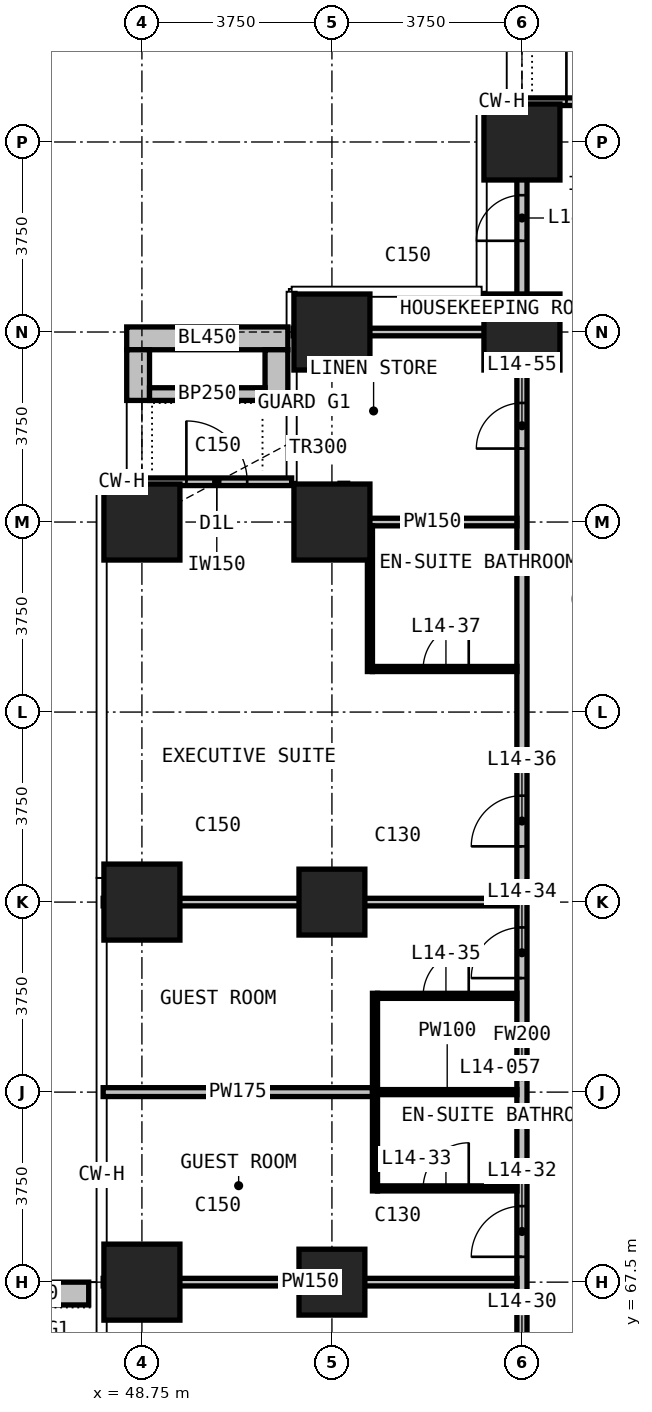
"""IFC4 building model, lengths in metres.
Left out: names, types, materials, properties, quantities, classifications, styles, units other than length and angle.
Written with IfcOpenShell. Run it as: python <this file> out.ifc"""

import sys

from ifc_helpers import new_model, si_unit, direction, frame, frame_2d, origin, origin_2d, place, context, subcontext, project, spatial, rectangle, extrude, element, fill, save


model = new_model("IFC4")
c1 = context("Model", 3, precision=1e-05, world=origin(), true_north=direction((0.0, 1.0)))
c2 = subcontext(c1, "Body", "Model", "MODEL_VIEW")
j1 = project(units=[si_unit("LENGTHUNIT", "METRE"), si_unit("PLANEANGLEUNIT", "RADIAN")], contexts=[c1])
p1 = place(None, origin())
s1 = spatial("IfcSite", under=j1, at=p1, CompositionType="ELEMENT")
p2 = place(p1, origin())
s2 = spatial("IfcBuilding", under=s1, at=p2, CompositionType="ELEMENT")
p3 = place(p2, frame((0.0, 0.0, 65.9)))
s3 = spatial("IfcBuildingStorey", under=s2, at=p3, CompositionType="ELEMENT", Elevation=65.9)
for number, where, z_axis, x_axis in (
    (1, (48.75, 67.5, 0.0), (0.0, 0.0, 1.0), (1.0, 0.0, 0.0)),
    (2, (48.75, 75.0, 0.0), (0.0, 0.0, 1.0), (1.0, 0.0, 0.0)),
    (3, (48.75, 82.5, 0.0), (0.0, 0.0, 1.0), (1.0, 0.0, 0.0)),
):
    element("IfcColumn", number, at=place(p3, frame(where, z_axis=z_axis, x_axis=x_axis)), inside=s3, PredefinedType="COLUMN", context=c2, shape_type="SweptSolid", body=[
        extrude(rectangle(XDim=1.5, YDim=1.5, at=origin_2d()), origin(), (0.0, 0.0, 1.0), 3.3),
    ])
for number, where, z_axis, x_axis in (
    (4, (52.5, 67.5, 0.0), (0.0, 0.0, 1.0), (1.0, 0.0, 0.0)),
    (5, (52.5, 75.0, 0.0), (0.0, 0.0, 1.0), (1.0, 0.0, 0.0)),
):
    element("IfcColumn", number, at=place(p3, frame(where, z_axis=z_axis, x_axis=x_axis)), inside=s3, PredefinedType="COLUMN", context=c2, shape_type="SweptSolid", body=[
        extrude(rectangle(XDim=1.3, YDim=1.3, at=origin_2d()), origin(), (0.0, 0.0, 1.0), 3.3),
    ])
for number, where, z_axis, x_axis in (
    (6, (52.5, 82.5, 0.0), (0.0, 0.0, 1.0), (1.0, 0.0, 0.0)),
    (7, (52.5, 86.25, 0.0), (0.0, 0.0, 1.0), (1.0, 0.0, 0.0)),
    (8, (56.25, 86.25, 0.0), (0.0, 0.0, 1.0), (1.0, 0.0, 0.0)),
    (9, (56.25, 90.0, 0.0), (0.0, 0.0, 1.0), (1.0, 0.0, 0.0)),
):
    element("IfcColumn", number, at=place(p3, frame(where, z_axis=z_axis, x_axis=x_axis)), inside=s3, PredefinedType="COLUMN", context=c2, shape_type="SweptSolid", body=[
        extrude(rectangle(XDim=1.5, YDim=1.5, at=origin_2d()), origin(), (0.0, 0.0, 1.0), 3.3),
    ])
p4 = place(p3, frame((56.25, 90.795, 0.0), z_axis=(0.0, 0.0, 1.0), x_axis=(1.0, 0.0, 0.0)))
e10 = element("IfcWall", 10, at=p4, inside=s3, PredefinedType="SOLIDWALL", context=c2, shape_type="SweptSolid", body=[
    extrude(rectangle(XDim=2.955, YDim=0.15, at=frame_2d((1.478, 0.0))), origin(), (0.0, 0.0, 1.0), 3.0),
])
p5 = place(p4, frame((0.877, 0.0, 0.0)))
e11 = element("IfcOpeningElement", 11, at=p5, cuts=e10, PredefinedType="OPENING", context=c2, shape_type="SweptSolid", body=[
    extrude(rectangle(XDim=1.2, YDim=2.4, at=frame_2d((0.6, 1.2))), frame((0.0, 0.085, 0.0), z_axis=(0.0, -1.0, 0.0), x_axis=(1.0, 0.0, 0.0)), (0.0, 0.0, 1.0), 0.17),
])
p6 = place(p3, frame((48.75, 83.295, 0.0), z_axis=(0.0, 0.0, 1.0), x_axis=(1.0, 0.0, 0.0)))
e12 = element("IfcWall", 12, at=p6, inside=s3, PredefinedType="SOLIDWALL", context=c2, shape_type="SweptSolid", body=[
    extrude(rectangle(XDim=2.955, YDim=0.15, at=frame_2d((1.478, 0.0))), origin(), (0.0, 0.0, 1.0), 3.0),
])
p7 = place(p6, frame((0.877, 0.0, 0.0)))
e13 = element("IfcOpeningElement", 13, at=p7, cuts=e12, PredefinedType="OPENING", context=c2, shape_type="SweptSolid", body=[
    extrude(rectangle(XDim=1.2, YDim=2.0, at=frame_2d((0.6, 1.0))), frame((0.0, 0.085, 0.0), z_axis=(0.0, -1.0, 0.0), x_axis=(1.0, 0.0, 0.0)), (0.0, 0.0, 1.0), 0.17),
])
p8 = place(p3, frame((48.45, 86.125, 0.0), z_axis=(0.0, 0.0, 1.0), x_axis=(1.0, 0.0, 0.0)))
e14 = element("IfcWall", 14, at=p8, inside=s3, PredefinedType="USERDEFINED", context=c2, shape_type="SweptSolid", body=[
    extrude(rectangle(XDim=3.18, YDim=0.45, at=frame_2d((1.59, 0.0))), origin(), (0.0, 0.0, 1.0), 1.1),
])
for number, where, z_axis, x_axis in (
    (15, (48.675, 84.9, 0.0), (0.0, 0.0, 1.0), (0.0, 1.0, 0.0)),
    (16, (51.405, 84.9, 0.0), (0.0, 0.0, 1.0), (0.0, 1.0, 0.0)),
):
    element("IfcWall", number, at=place(p3, frame(where, z_axis=z_axis, x_axis=x_axis)), inside=s3, PredefinedType="USERDEFINED", context=c2, shape_type="SweptSolid", body=[
        extrude(rectangle(XDim=1.0, YDim=0.45, at=frame_2d((0.5, 0.0))), origin(), (0.0, 0.0, 1.0), 1.1),
    ])
p9 = place(p3, frame((48.9, 85.025, 0.0), z_axis=(0.0, 0.0, 1.0), x_axis=(1.0, 0.0, 0.0)))
e17 = element("IfcWall", 17, at=p9, inside=s3, PredefinedType="USERDEFINED", context=c2, shape_type="SweptSolid", body=[
    extrude(rectangle(XDim=2.28, YDim=0.25, at=frame_2d((1.14, 0.0))), origin(), (0.0, 0.0, 1.0), 1.0),
])
p10 = place(p3, frame((47.7, 67.275, 0.0), z_axis=(0.0, 0.0, 1.0), x_axis=(-1.0, 0.0, 0.0)))
e18 = element("IfcWall", 18, at=p10, inside=s3, PredefinedType="USERDEFINED", context=c2, shape_type="SweptSolid", body=[
    extrude(rectangle(XDim=2.35, YDim=0.45, at=frame_2d((1.175, 0.0))), origin(), (0.0, 0.0, 1.0), 1.1),
])
p11 = place(p3, frame((56.25, 52.4, 0.0), z_axis=(0.0, 0.0, 1.0), x_axis=(0.0, 1.0, 0.0)))
e19 = element("IfcWall", 19, at=p11, inside=s3, PredefinedType="PARTITIONING", context=c2, shape_type="SweptSolid", body=[
    extrude(rectangle(XDim=38.31, YDim=0.2, at=frame_2d((19.155, 0.0))), origin(), (0.0, 0.0, 1.0), 3.0),
])
p12 = place(p11, frame((2.35, 0.0, 0.0)))
e20 = element("IfcOpeningElement", 20, at=p12, cuts=e19, PredefinedType="OPENING", context=c2, shape_type="SweptSolid", body=[
    extrude(rectangle(XDim=1.0, YDim=2.2, at=frame_2d((0.5, 1.1))), frame((0.0, 0.11, 0.0), z_axis=(0.0, -1.0, 0.0), x_axis=(1.0, 0.0, 0.0)), (0.0, 0.0, 1.0), 0.22),
])
p13 = place(p11, frame((4.35, 0.0, 0.0)))
e21 = element("IfcOpeningElement", 21, at=p13, cuts=e19, PredefinedType="OPENING", context=c2, shape_type="SweptSolid", body=[
    extrude(rectangle(XDim=1.0, YDim=2.2, at=frame_2d((0.5, 1.1))), frame((0.0, 0.11, 0.0), z_axis=(0.0, -1.0, 0.0), x_axis=(1.0, 0.0, 0.0)), (0.0, 0.0, 1.0), 0.22),
])
p14 = place(p11, frame((13.0, 0.0, 0.0)))
e22 = element("IfcOpeningElement", 22, at=p14, cuts=e19, PredefinedType="OPENING", context=c2, shape_type="SweptSolid", body=[
    extrude(rectangle(XDim=1.0, YDim=2.2, at=frame_2d((0.5, 1.1))), frame((0.0, 0.11, 0.0), z_axis=(0.0, -1.0, 0.0), x_axis=(1.0, 0.0, 0.0)), (0.0, 0.0, 1.0), 0.22),
])
p15 = place(p11, frame((15.6, 0.0, 0.0)))
e23 = element("IfcOpeningElement", 23, at=p15, cuts=e19, PredefinedType="OPENING", context=c2, shape_type="SweptSolid", body=[
    extrude(rectangle(XDim=1.0, YDim=2.2, at=frame_2d((0.5, 1.1))), frame((0.0, 0.11, 0.0), z_axis=(0.0, -1.0, 0.0), x_axis=(1.0, 0.0, 0.0)), (0.0, 0.0, 1.0), 0.22),
])
p16 = place(p11, frame((21.1, 0.0, 0.0)))
e24 = element("IfcOpeningElement", 24, at=p16, cuts=e19, PredefinedType="OPENING", context=c2, shape_type="SweptSolid", body=[
    extrude(rectangle(XDim=1.0, YDim=2.2, at=frame_2d((0.5, 1.1))), frame((0.0, 0.11, 0.0), z_axis=(0.0, -1.0, 0.0), x_axis=(1.0, 0.0, 0.0)), (0.0, 0.0, 1.0), 0.22),
])
p17 = place(p11, frame((23.7, 0.0, 0.0)))
e25 = element("IfcOpeningElement", 25, at=p17, cuts=e19, PredefinedType="OPENING", context=c2, shape_type="SweptSolid", body=[
    extrude(rectangle(XDim=1.0, YDim=2.2, at=frame_2d((0.5, 1.1))), frame((0.0, 0.11, 0.0), z_axis=(0.0, -1.0, 0.0), x_axis=(1.0, 0.0, 0.0)), (0.0, 0.0, 1.0), 0.22),
])
p18 = place(p11, frame((31.55, 0.0, 0.0)))
e26 = element("IfcOpeningElement", 26, at=p18, cuts=e19, PredefinedType="OPENING", context=c2, shape_type="SweptSolid", body=[
    extrude(rectangle(XDim=0.9, YDim=2.2, at=frame_2d((0.45, 1.1))), frame((0.0, 0.11, 0.0), z_axis=(0.0, -1.0, 0.0), x_axis=(1.0, 0.0, 0.0)), (0.0, 0.0, 1.0), 0.22),
])
p19 = place(p11, frame((35.65, 0.0, 0.0)))
e27 = element("IfcOpeningElement", 27, at=p19, cuts=e19, PredefinedType="OPENING", context=c2, shape_type="SweptSolid", body=[
    extrude(rectangle(XDim=0.9, YDim=2.2, at=frame_2d((0.45, 1.1))), frame((0.0, 0.11, 0.0), z_axis=(0.0, -1.0, 0.0), x_axis=(1.0, 0.0, 0.0)), (0.0, 0.0, 1.0), 0.22),
])
p20 = place(p3, frame((47.985, 71.25, 0.0), z_axis=(0.0, 0.0, 1.0), x_axis=(1.0, 0.0, 0.0)))
e28 = element("IfcWall", 28, at=p20, inside=s3, PredefinedType="PARTITIONING", context=c2, shape_type="SweptSolid", body=[
    extrude(rectangle(XDim=5.315, YDim=0.175, at=frame_2d((2.657, 0.0))), origin(), (0.0, 0.0, 1.0), 3.0),
])
for number, where, z_axis, x_axis in (
    (29, (47.985, 67.5, 0.0), (0.0, 0.0, 1.0), (1.0, 0.0, 0.0)),
    (30, (47.985, 75.0, 0.0), (0.0, 0.0, 1.0), (1.0, 0.0, 0.0)),
):
    element("IfcWall", number, at=place(p3, frame(where, z_axis=z_axis, x_axis=x_axis)), inside=s3, PredefinedType="PARTITIONING", context=c2, shape_type="SweptSolid", body=[
        extrude(rectangle(XDim=8.165, YDim=0.15, at=frame_2d((4.083, 0.0))), origin(), (0.0, 0.0, 1.0), 3.0),
    ])
p21 = place(p3, frame((52.81, 82.5, 0.0), z_axis=(0.0, 0.0, 1.0), x_axis=(1.0, 0.0, 0.0)))
e31 = element("IfcWall", 31, at=p21, inside=s3, PredefinedType="PARTITIONING", context=c2, shape_type="SweptSolid", body=[
    extrude(rectangle(XDim=3.34, YDim=0.15, at=frame_2d((1.67, 0.0))), origin(), (0.0, 0.0, 1.0), 3.0),
])
p22 = place(p3, frame((51.735, 86.25, 0.0), z_axis=(0.0, 0.0, 1.0), x_axis=(1.0, 0.0, 0.0)))
e32 = element("IfcWall", 32, at=p22, inside=s3, PredefinedType="PARTITIONING", context=c2, shape_type="SweptSolid", body=[
    extrude(rectangle(XDim=4.415, YDim=0.15, at=frame_2d((2.208, 0.0))), origin(), (0.0, 0.0, 1.0), 3.0),
])
p23 = place(p3, frame((52.735, 82.425, 0.0), z_axis=(0.0, 0.0, 1.0), x_axis=(0.0, 1.0, 0.0)))
e33 = element("IfcWall", 33, at=p23, inside=s3, PredefinedType="PARTITIONING", context=c2, shape_type="SweptSolid", body=[
    extrude(rectangle(XDim=0.84, YDim=0.15, at=frame_2d((0.42, 0.0))), origin(), (0.0, 0.0, 1.0), 3.0),
])
p24 = place(p3, frame((53.4, 69.35, 0.0), z_axis=(0.0, 0.0, 1.0), x_axis=(1.0, 0.0, 0.0)))
e34 = element("IfcWall", 34, at=p24, inside=s3, PredefinedType="PARTITIONING", context=c2, shape_type="SweptSolid", body=[
    extrude(rectangle(XDim=2.75, YDim=0.1, at=frame_2d((1.375, 0.0))), origin(), (0.0, 0.0, 1.0), 3.0),
])
p25 = place(p24, frame((0.9, 0.0, 0.0)))
e35 = element("IfcOpeningElement", 35, at=p25, cuts=e34, PredefinedType="OPENING", context=c2, shape_type="SweptSolid", body=[
    extrude(rectangle(XDim=0.9, YDim=2.2, at=frame_2d((0.45, 1.1))), frame((0.0, 0.06, 0.0), z_axis=(0.0, -1.0, 0.0), x_axis=(1.0, 0.0, 0.0)), (0.0, 0.0, 1.0), 0.12),
])
p26 = place(p3, frame((53.4, 71.25, 0.0), z_axis=(0.0, 0.0, 1.0), x_axis=(1.0, 0.0, 0.0)))
e36 = element("IfcWall", 36, at=p26, inside=s3, PredefinedType="PARTITIONING", context=c2, shape_type="SweptSolid", body=[
    extrude(rectangle(XDim=2.75, YDim=0.1, at=frame_2d((1.375, 0.0))), origin(), (0.0, 0.0, 1.0), 3.0),
])
p27 = place(p3, frame((53.4, 73.15, 0.0), z_axis=(0.0, 0.0, 1.0), x_axis=(1.0, 0.0, 0.0)))
e37 = element("IfcWall", 37, at=p27, inside=s3, PredefinedType="PARTITIONING", context=c2, shape_type="SweptSolid", body=[
    extrude(rectangle(XDim=2.75, YDim=0.1, at=frame_2d((1.375, 0.0))), origin(), (0.0, 0.0, 1.0), 3.0),
])
p28 = place(p27, frame((0.9, 0.0, 0.0)))
e38 = element("IfcOpeningElement", 38, at=p28, cuts=e37, PredefinedType="OPENING", context=c2, shape_type="SweptSolid", body=[
    extrude(rectangle(XDim=0.9, YDim=2.2, at=frame_2d((0.45, 1.1))), frame((0.0, 0.06, 0.0), z_axis=(0.0, -1.0, 0.0), x_axis=(1.0, 0.0, 0.0)), (0.0, 0.0, 1.0), 0.12),
])
p29 = place(p3, frame((53.3, 79.6, 0.0), z_axis=(0.0, 0.0, 1.0), x_axis=(1.0, 0.0, 0.0)))
e39 = element("IfcWall", 39, at=p29, inside=s3, PredefinedType="PARTITIONING", context=c2, shape_type="SweptSolid", body=[
    extrude(rectangle(XDim=2.85, YDim=0.1, at=frame_2d((1.425, 0.0))), origin(), (0.0, 0.0, 1.0), 3.0),
])
p30 = place(p29, frame((1.0, 0.0, 0.0)))
e40 = element("IfcOpeningElement", 40, at=p30, cuts=e39, PredefinedType="OPENING", context=c2, shape_type="SweptSolid", body=[
    extrude(rectangle(XDim=0.9, YDim=2.2, at=frame_2d((0.45, 1.1))), frame((0.0, 0.06, 0.0), z_axis=(0.0, -1.0, 0.0), x_axis=(1.0, 0.0, 0.0)), (0.0, 0.0, 1.0), 0.12),
])
p31 = place(p3, frame((53.25, 79.55, 0.0), z_axis=(0.0, 0.0, 1.0), x_axis=(0.0, 1.0, 0.0)))
e41 = element("IfcWall", 41, at=p31, inside=s3, PredefinedType="PARTITIONING", context=c2, shape_type="SweptSolid", body=[
    extrude(rectangle(XDim=2.875, YDim=0.1, at=frame_2d((1.438, 0.0))), origin(), (0.0, 0.0, 1.0), 3.0),
])
p32 = place(p3, frame((53.35, 69.3, 0.0), z_axis=(0.0, 0.0, 1.0), x_axis=(0.0, 1.0, 0.0)))
e42 = element("IfcWall", 42, at=p32, inside=s3, PredefinedType="PARTITIONING", context=c2, shape_type="SweptSolid", body=[
    extrude(rectangle(XDim=3.9, YDim=0.1, at=frame_2d((1.95, 0.0))), origin(), (0.0, 0.0, 1.0), 3.0),
])
p33 = place(p5, origin())
e43 = element("IfcDoor", 43, at=p33, inside=s3, OperationType="SINGLE_SWING_LEFT", PredefinedType="DOOR", context=c2, shape_type="SweptSolid", body=[
    extrude(rectangle(XDim=1.2, YDim=2.4, at=frame_2d((0.6, 1.2))), frame((0.0, 0.025, 0.0), z_axis=(0.0, -1.0, 0.0), x_axis=(1.0, 0.0, 0.0)), (0.0, 0.0, 1.0), 0.05),
])
fill(e11, e43)
p34 = place(p7, origin())
e44 = element("IfcDoor", 44, at=p34, inside=s3, OperationType="SINGLE_SWING_LEFT", PredefinedType="DOOR", context=c2, shape_type="SweptSolid", body=[
    extrude(rectangle(XDim=1.2, YDim=2.0, at=frame_2d((0.6, 1.0))), frame((0.0, 0.025, 0.0), z_axis=(0.0, -1.0, 0.0), x_axis=(1.0, 0.0, 0.0)), (0.0, 0.0, 1.0), 0.05),
])
fill(e13, e44)
p35 = place(p15, origin())
e45 = element("IfcDoor", 45, at=p35, inside=s3, OperationType="SINGLE_SWING_LEFT", PredefinedType="DOOR", context=c2, shape_type="SweptSolid", body=[
    extrude(rectangle(XDim=1.0, YDim=2.2, at=frame_2d((0.5, 1.1))), frame((0.0, 0.025, 0.0), z_axis=(0.0, -1.0, 0.0), x_axis=(1.0, 0.0, 0.0)), (0.0, 0.0, 1.0), 0.05),
])
fill(e23, e45)
p36 = place(p25, origin())
e46 = element("IfcDoor", 46, at=p36, inside=s3, OperationType="SINGLE_SWING_RIGHT", PredefinedType="DOOR", context=c2, shape_type="SweptSolid", body=[
    extrude(rectangle(XDim=0.9, YDim=2.2, at=frame_2d((0.45, 1.1))), frame((0.0, 0.025, 0.0), z_axis=(0.0, -1.0, 0.0), x_axis=(1.0, 0.0, 0.0)), (0.0, 0.0, 1.0), 0.05),
])
fill(e35, e46)
p37 = place(p16, origin())
e47 = element("IfcDoor", 47, at=p37, inside=s3, OperationType="SINGLE_SWING_RIGHT", PredefinedType="DOOR", context=c2, shape_type="SweptSolid", body=[
    extrude(rectangle(XDim=1.0, YDim=2.2, at=frame_2d((0.5, 1.1))), frame((0.0, 0.025, 0.0), z_axis=(0.0, -1.0, 0.0), x_axis=(1.0, 0.0, 0.0)), (0.0, 0.0, 1.0), 0.05),
])
fill(e24, e47)
p38 = place(p28, origin())
e48 = element("IfcDoor", 48, at=p38, inside=s3, OperationType="SINGLE_SWING_RIGHT", PredefinedType="DOOR", context=c2, shape_type="SweptSolid", body=[
    extrude(rectangle(XDim=0.9, YDim=2.2, at=frame_2d((0.45, 1.1))), frame((0.0, 0.025, 0.0), z_axis=(0.0, -1.0, 0.0), x_axis=(1.0, 0.0, 0.0)), (0.0, 0.0, 1.0), 0.05),
])
fill(e38, e48)
p39 = place(p17, origin())
e49 = element("IfcDoor", 49, at=p39, inside=s3, OperationType="SINGLE_SWING_RIGHT", PredefinedType="DOOR", context=c2, shape_type="SweptSolid", body=[
    extrude(rectangle(XDim=1.0, YDim=2.2, at=frame_2d((0.5, 1.1))), frame((0.0, 0.025, 0.0), z_axis=(0.0, -1.0, 0.0), x_axis=(1.0, 0.0, 0.0)), (0.0, 0.0, 1.0), 0.05),
])
fill(e25, e49)
p40 = place(p30, origin())
e50 = element("IfcDoor", 50, at=p40, inside=s3, OperationType="SINGLE_SWING_RIGHT", PredefinedType="DOOR", context=c2, shape_type="SweptSolid", body=[
    extrude(rectangle(XDim=0.9, YDim=2.2, at=frame_2d((0.45, 1.1))), frame((0.0, 0.025, 0.0), z_axis=(0.0, -1.0, 0.0), x_axis=(1.0, 0.0, 0.0)), (0.0, 0.0, 1.0), 0.05),
])
fill(e40, e50)
p41 = place(p18, origin())
e51 = element("IfcDoor", 51, at=p41, inside=s3, OperationType="SINGLE_SWING_LEFT", PredefinedType="DOOR", context=c2, shape_type="SweptSolid", body=[
    extrude(rectangle(XDim=0.9, YDim=2.2, at=frame_2d((0.45, 1.1))), frame((0.0, 0.025, 0.0), z_axis=(0.0, -1.0, 0.0), x_axis=(1.0, 0.0, 0.0)), (0.0, 0.0, 1.0), 0.05),
])
fill(e26, e51)
p42 = place(p19, origin())
e52 = element("IfcDoor", 52, at=p42, inside=s3, OperationType="SINGLE_SWING_LEFT", PredefinedType="DOOR", context=c2, shape_type="SweptSolid", body=[
    extrude(rectangle(XDim=0.9, YDim=2.2, at=frame_2d((0.45, 1.1))), frame((0.0, 0.025, 0.0), z_axis=(0.0, -1.0, 0.0), x_axis=(1.0, 0.0, 0.0)), (0.0, 0.0, 1.0), 0.05),
])
fill(e27, e52)
save(model, sys.argv[1])
